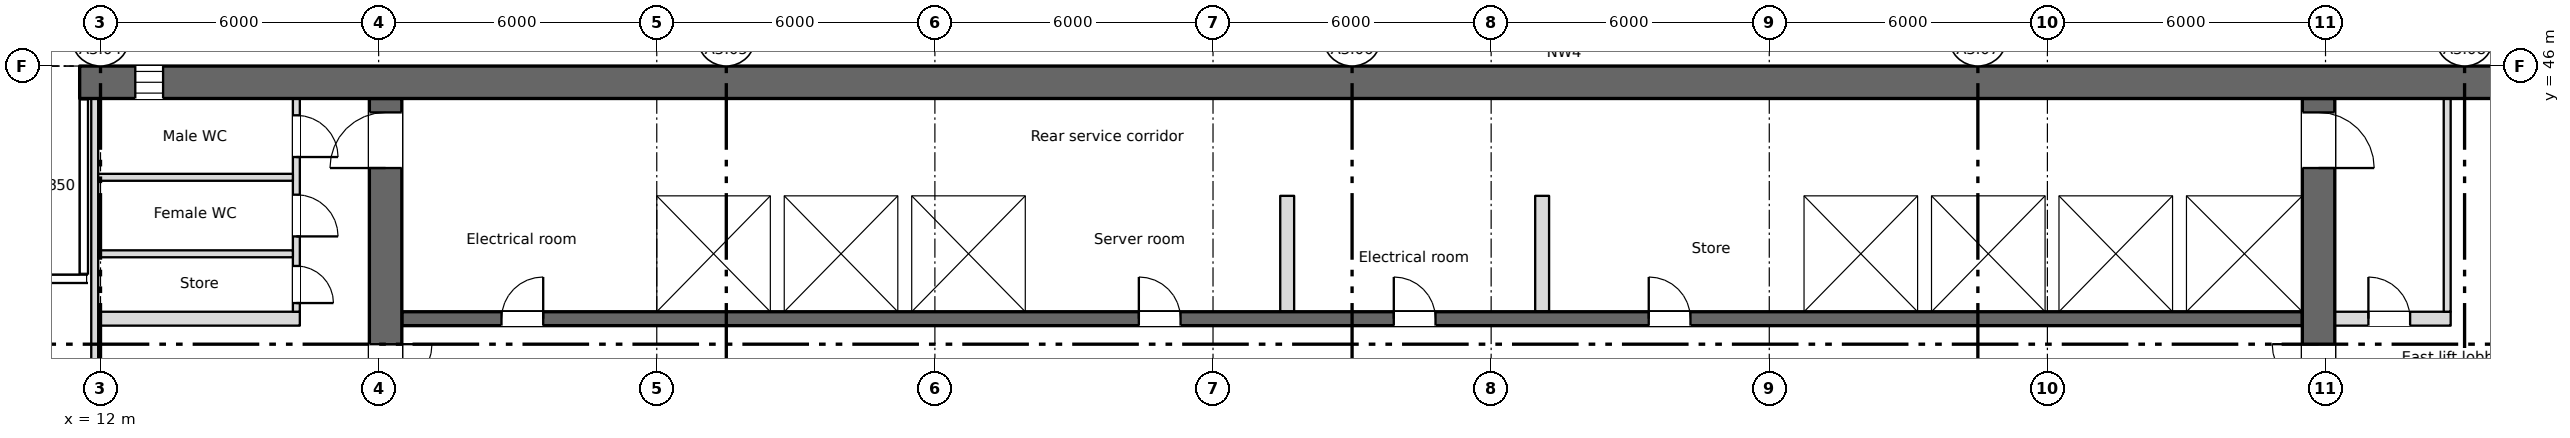
"""IFC4 building model, lengths in metres.
Left out: names, types, materials, properties, quantities, classifications, styles, units other than length and angle.
Written with IfcOpenShell. Run it as: python <this file> out.ifc"""

import sys

from ifc_helpers import new_model, si_unit, direction, frame, frame_2d, origin, place, context, subcontext, project, spatial, rectangle, extrude, element, fill, save


model = new_model("IFC4")
c1 = context("Model", 3, precision=1e-05, world=origin(), true_north=direction((0.0, 1.0)))
c2 = subcontext(c1, "Body", "Model", "MODEL_VIEW")
j1 = project(units=[si_unit("LENGTHUNIT", "METRE"), si_unit("PLANEANGLEUNIT", "RADIAN")], contexts=[c1])
p1 = place(None, origin())
s1 = spatial("IfcSite", under=j1, at=p1, CompositionType="ELEMENT")
p2 = place(p1, origin())
s2 = spatial("IfcBuilding", under=s1, at=p2, CompositionType="ELEMENT")
p3 = place(p2, frame((0.0, 0.0, 215.5)))
s3 = spatial("IfcBuildingStorey", under=s2, at=p3, CompositionType="ELEMENT", Elevation=215.5)
p4 = place(p3, frame((11.55, 45.65, 0.0), z_axis=(0.0, 0.0, 1.0), x_axis=(1.0, 0.0, 0.0)))
e1 = element("IfcWall", 1, at=p4, inside=s3, PredefinedType="SHEAR", context=c2, shape_type="SweptSolid", body=[
    extrude(rectangle(XDim=54.9, YDim=0.7, at=frame_2d((27.45, 0.0))), origin(), (0.0, 0.0, 1.0), 3.35),
])
p5 = place(p4, frame((1.2, 0.0, 0.6)))
e2 = element("IfcOpeningElement", 2, at=p5, cuts=e1, PredefinedType="OPENING", context=c2, shape_type="SweptSolid", body=[
    extrude(rectangle(XDim=0.6, YDim=2.4, at=frame_2d((0.3, 1.2))), frame((0.0, 0.36, 0.0), z_axis=(0.0, -1.0, 0.0), x_axis=(1.0, 0.0, 0.0)), (0.0, 0.0, 1.0), 0.72),
])
p6 = place(p3, frame((18.15, 28.4, 0.0), z_axis=(0.0, 0.0, 1.0), x_axis=(0.0, 1.0, 0.0)))
e3 = element("IfcWall", 3, at=p6, inside=s3, PredefinedType="SHEAR", context=c2, shape_type="SweptSolid", body=[
    extrude(rectangle(XDim=16.9, YDim=0.7, at=frame_2d((8.45, 0.0))), origin(), (0.0, 0.0, 1.0), 3.35),
])
p7 = place(p6, frame((9.6, 0.0, 0.0)))
e4 = element("IfcOpeningElement", 4, at=p7, cuts=e3, PredefinedType="OPENING", context=c2, shape_type="SweptSolid", body=[
    extrude(rectangle(XDim=2.0, YDim=2.1, at=frame_2d((1.0, 1.05))), frame((0.0, 0.36, 0.0), z_axis=(0.0, -1.0, 0.0), x_axis=(1.0, 0.0, 0.0)), (0.0, 0.0, 1.0), 0.72),
])
p8 = place(p6, frame((15.4, 0.0, 0.0)))
e5 = element("IfcOpeningElement", 5, at=p8, cuts=e3, PredefinedType="OPENING", context=c2, shape_type="SweptSolid", body=[
    extrude(rectangle(XDim=1.2, YDim=2.1, at=frame_2d((0.6, 1.05))), frame((0.0, 0.36, 0.0), z_axis=(0.0, -1.0, 0.0), x_axis=(1.0, 0.0, 0.0)), (0.0, 0.0, 1.0), 0.72),
])
p9 = place(p3, frame((59.85, 28.4, 0.0), z_axis=(0.0, 0.0, 1.0), x_axis=(0.0, 1.0, 0.0)))
e6 = element("IfcWall", 6, at=p9, inside=s3, PredefinedType="SHEAR", context=c2, shape_type="SweptSolid", body=[
    extrude(rectangle(XDim=16.9, YDim=0.7, at=frame_2d((8.45, 0.0))), origin(), (0.0, 0.0, 1.0), 3.35),
])
p10 = place(p9, frame((9.6, 0.0, 0.0)))
e7 = element("IfcOpeningElement", 7, at=p10, cuts=e6, PredefinedType="OPENING", context=c2, shape_type="SweptSolid", body=[
    extrude(rectangle(XDim=2.0, YDim=2.1, at=frame_2d((1.0, 1.05))), frame((0.0, 0.36, 0.0), z_axis=(0.0, -1.0, 0.0), x_axis=(1.0, 0.0, 0.0)), (0.0, 0.0, 1.0), 0.72),
])
p11 = place(p9, frame((15.4, 0.0, 0.0)))
e8 = element("IfcOpeningElement", 8, at=p11, cuts=e6, PredefinedType="OPENING", context=c2, shape_type="SweptSolid", body=[
    extrude(rectangle(XDim=1.2, YDim=2.1, at=frame_2d((0.6, 1.05))), frame((0.0, 0.36, 0.0), z_axis=(0.0, -1.0, 0.0), x_axis=(1.0, 0.0, 0.0)), (0.0, 0.0, 1.0), 0.72),
])
p12 = place(p3, frame((18.5, 40.55, 0.0), z_axis=(0.0, 0.0, 1.0), x_axis=(1.0, 0.0, 0.0)))
e9 = element("IfcWall", 9, at=p12, inside=s3, PredefinedType="SHEAR", context=c2, shape_type="SweptSolid", body=[
    extrude(rectangle(XDim=41.0, YDim=0.3, at=frame_2d((20.5, 0.0))), origin(), (0.0, 0.0, 1.0), 3.35),
])
p13 = place(p12, frame((2.15, 0.0, 0.0)))
e10 = element("IfcOpeningElement", 10, at=p13, cuts=e9, PredefinedType="OPENING", context=c2, shape_type="SweptSolid", body=[
    extrude(rectangle(XDim=0.9, YDim=2.1, at=frame_2d((0.45, 1.05))), frame((0.0, 0.16, 0.0), z_axis=(0.0, -1.0, 0.0), x_axis=(1.0, 0.0, 0.0)), (0.0, 0.0, 1.0), 0.32),
])
p14 = place(p12, frame((15.9, 0.0, 0.0)))
e11 = element("IfcOpeningElement", 11, at=p14, cuts=e9, PredefinedType="OPENING", context=c2, shape_type="SweptSolid", body=[
    extrude(rectangle(XDim=0.9, YDim=2.1, at=frame_2d((0.45, 1.05))), frame((0.0, 0.16, 0.0), z_axis=(0.0, -1.0, 0.0), x_axis=(1.0, 0.0, 0.0)), (0.0, 0.0, 1.0), 0.32),
])
p15 = place(p12, frame((21.4, 0.0, 0.0)))
e12 = element("IfcOpeningElement", 12, at=p15, cuts=e9, PredefinedType="OPENING", context=c2, shape_type="SweptSolid", body=[
    extrude(rectangle(XDim=0.9, YDim=2.1, at=frame_2d((0.45, 1.05))), frame((0.0, 0.16, 0.0), z_axis=(0.0, -1.0, 0.0), x_axis=(1.0, 0.0, 0.0)), (0.0, 0.0, 1.0), 0.32),
])
p16 = place(p12, frame((26.9, 0.0, 0.0)))
e13 = element("IfcOpeningElement", 13, at=p16, cuts=e9, PredefinedType="OPENING", context=c2, shape_type="SweptSolid", body=[
    extrude(rectangle(XDim=0.9, YDim=2.1, at=frame_2d((0.45, 1.05))), frame((0.0, 0.16, 0.0), z_axis=(0.0, -1.0, 0.0), x_axis=(1.0, 0.0, 0.0)), (0.0, 0.0, 1.0), 0.32),
])
p17 = place(p12, frame((6.175, 0.0, 0.0)))
e14 = element("IfcOpeningElement", 14, at=p17, cuts=e9, PredefinedType="OPENING", context=c2, shape_type="SweptSolid", body=[
    extrude(rectangle(XDim=1.1, YDim=2.1, at=frame_2d((0.55, 1.05))), frame((0.0, 0.16, 0.0), z_axis=(0.0, -1.0, 0.0), x_axis=(1.0, 0.0, 0.0)), (0.0, 0.0, 1.0), 0.32),
])
p18 = place(p12, frame((8.925, 0.0, 0.0)))
e15 = element("IfcOpeningElement", 15, at=p18, cuts=e9, PredefinedType="OPENING", context=c2, shape_type="SweptSolid", body=[
    extrude(rectangle(XDim=1.1, YDim=2.1, at=frame_2d((0.55, 1.05))), frame((0.0, 0.16, 0.0), z_axis=(0.0, -1.0, 0.0), x_axis=(1.0, 0.0, 0.0)), (0.0, 0.0, 1.0), 0.32),
])
p19 = place(p12, frame((11.675, 0.0, 0.0)))
e16 = element("IfcOpeningElement", 16, at=p19, cuts=e9, PredefinedType="OPENING", context=c2, shape_type="SweptSolid", body=[
    extrude(rectangle(XDim=1.1, YDim=2.1, at=frame_2d((0.55, 1.05))), frame((0.0, 0.16, 0.0), z_axis=(0.0, -1.0, 0.0), x_axis=(1.0, 0.0, 0.0)), (0.0, 0.0, 1.0), 0.32),
])
p20 = place(p12, frame((30.925, 0.0, 0.0)))
e17 = element("IfcOpeningElement", 17, at=p20, cuts=e9, PredefinedType="OPENING", context=c2, shape_type="SweptSolid", body=[
    extrude(rectangle(XDim=1.1, YDim=2.1, at=frame_2d((0.55, 1.05))), frame((0.0, 0.16, 0.0), z_axis=(0.0, -1.0, 0.0), x_axis=(1.0, 0.0, 0.0)), (0.0, 0.0, 1.0), 0.32),
])
p21 = place(p12, frame((33.675, 0.0, 0.0)))
e18 = element("IfcOpeningElement", 18, at=p21, cuts=e9, PredefinedType="OPENING", context=c2, shape_type="SweptSolid", body=[
    extrude(rectangle(XDim=1.1, YDim=2.1, at=frame_2d((0.55, 1.05))), frame((0.0, 0.16, 0.0), z_axis=(0.0, -1.0, 0.0), x_axis=(1.0, 0.0, 0.0)), (0.0, 0.0, 1.0), 0.32),
])
p22 = place(p12, frame((36.375, 0.0, 0.0)))
e19 = element("IfcOpeningElement", 19, at=p22, cuts=e9, PredefinedType="OPENING", context=c2, shape_type="SweptSolid", body=[
    extrude(rectangle(XDim=1.2, YDim=2.1, at=frame_2d((0.6, 1.05))), frame((0.0, 0.16, 0.0), z_axis=(0.0, -1.0, 0.0), x_axis=(1.0, 0.0, 0.0)), (0.0, 0.0, 1.0), 0.32),
])
p23 = place(p12, frame((39.15, 0.0, 0.0)))
e20 = element("IfcOpeningElement", 20, at=p23, cuts=e9, PredefinedType="OPENING", context=c2, shape_type="SweptSolid", body=[
    extrude(rectangle(XDim=1.2, YDim=2.1, at=frame_2d((0.6, 1.05))), frame((0.0, 0.16, 0.0), z_axis=(0.0, -1.0, 0.0), x_axis=(1.0, 0.0, 0.0)), (0.0, 0.0, 1.0), 0.32),
])
p24 = place(p3, frame((18.5, 43.35, 0.0), z_axis=(0.0, 0.0, 1.0), x_axis=(1.0, 0.0, 0.0)))
e21 = element("IfcWall", 21, at=p24, inside=s3, PredefinedType="SHEAR", context=c2, shape_type="SweptSolid", body=[
    extrude(rectangle(XDim=41.0, YDim=0.3, at=frame_2d((20.5, 0.0))), origin(), (0.0, 0.0, 1.0), 3.35),
])
p25 = place(p3, frame((11.95, 40.55, 0.0), z_axis=(0.0, 0.0, 1.0), x_axis=(1.0, 0.0, 0.0)))
e22 = element("IfcWall", 22, at=p25, inside=s3, PredefinedType="PARTITIONING", context=c2, shape_type="SweptSolid", body=[
    extrude(rectangle(XDim=4.35, YDim=0.3, at=frame_2d((2.175, 0.0))), origin(), (0.0, 0.0, 1.0), 3.35),
])
p26 = place(p3, frame((60.2, 40.55, 0.0), z_axis=(0.0, 0.0, 1.0), x_axis=(1.0, 0.0, 0.0)))
e23 = element("IfcWall", 23, at=p26, inside=s3, PredefinedType="PARTITIONING", context=c2, shape_type="SweptSolid", body=[
    extrude(rectangle(XDim=2.5, YDim=0.3, at=frame_2d((1.25, 0.0))), origin(), (0.0, 0.0, 1.0), 3.35),
])
p27 = place(p26, frame((0.725, 0.0, 0.0)))
e24 = element("IfcOpeningElement", 24, at=p27, cuts=e23, PredefinedType="OPENING", context=c2, shape_type="SweptSolid", body=[
    extrude(rectangle(XDim=0.9, YDim=2.1, at=frame_2d((0.45, 1.05))), frame((0.0, 0.16, 0.0), z_axis=(0.0, -1.0, 0.0), x_axis=(1.0, 0.0, 0.0)), (0.0, 0.0, 1.0), 0.32),
])
for number, where, z_axis, x_axis in (
    (25, (23.85, 40.7, 0.0), (0.0, 0.0, 1.0), (0.0, 1.0, 0.0)),
    (26, (26.6, 40.7, 0.0), (0.0, 0.0, 1.0), (0.0, 1.0, 0.0)),
    (27, (29.35, 40.7, 0.0), (0.0, 0.0, 1.0), (0.0, 1.0, 0.0)),
    (28, (32.1, 40.7, 0.0), (0.0, 0.0, 1.0), (0.0, 1.0, 0.0)),
    (29, (48.6, 40.7, 0.0), (0.0, 0.0, 1.0), (0.0, 1.0, 0.0)),
    (30, (51.35, 40.7, 0.0), (0.0, 0.0, 1.0), (0.0, 1.0, 0.0)),
    (31, (54.1, 40.7, 0.0), (0.0, 0.0, 1.0), (0.0, 1.0, 0.0)),
    (32, (56.85, 40.7, 0.0), (0.0, 0.0, 1.0), (0.0, 1.0, 0.0)),
):
    element("IfcWall", number, at=place(p3, frame(where, z_axis=z_axis, x_axis=x_axis)), inside=s3, PredefinedType="SHEAR", context=c2, shape_type="SweptSolid", body=[
        extrude(rectangle(XDim=2.5, YDim=0.3, at=frame_2d((1.25, 0.0))), origin(), (0.0, 0.0, 1.0), 3.35),
    ])
p28 = place(p3, frame((16.225, 45.3, 0.0), z_axis=(0.0, 0.0, 1.0), x_axis=(0.0, -1.0, 0.0)))
e33 = element("IfcWall", 33, at=p28, inside=s3, PredefinedType="PARTITIONING", context=c2, shape_type="SweptSolid", body=[
    extrude(rectangle(XDim=4.6, YDim=0.15, at=frame_2d((2.3, 0.0))), origin(), (0.0, 0.0, 1.0), 3.35),
])
p29 = place(p28, frame((3.613, 0.0, 0.0)))
e34 = element("IfcOpeningElement", 34, at=p29, cuts=e33, PredefinedType="OPENING", context=c2, shape_type="SweptSolid", body=[
    extrude(rectangle(XDim=0.8, YDim=2.1, at=frame_2d((0.4, 1.05))), frame((0.0, 0.085, 0.0), z_axis=(0.0, -1.0, 0.0), x_axis=(1.0, 0.0, 0.0)), (0.0, 0.0, 1.0), 0.17),
])
p30 = place(p28, frame((2.075, 0.0, 0.0)))
e35 = element("IfcOpeningElement", 35, at=p30, cuts=e33, PredefinedType="OPENING", context=c2, shape_type="SweptSolid", body=[
    extrude(rectangle(XDim=0.9, YDim=2.1, at=frame_2d((0.45, 1.05))), frame((0.0, 0.085, 0.0), z_axis=(0.0, -1.0, 0.0), x_axis=(1.0, 0.0, 0.0)), (0.0, 0.0, 1.0), 0.17),
])
p31 = place(p28, frame((0.363, 0.0, 0.0)))
e36 = element("IfcOpeningElement", 36, at=p31, cuts=e33, PredefinedType="OPENING", context=c2, shape_type="SweptSolid", body=[
    extrude(rectangle(XDim=0.9, YDim=2.1, at=frame_2d((0.45, 1.05))), frame((0.0, 0.085, 0.0), z_axis=(0.0, -1.0, 0.0), x_axis=(1.0, 0.0, 0.0)), (0.0, 0.0, 1.0), 0.17),
])
p32 = place(p3, frame((62.625, 40.7, 0.0), z_axis=(0.0, 0.0, 1.0), x_axis=(0.0, 1.0, 0.0)))
e37 = element("IfcWall", 37, at=p32, inside=s3, PredefinedType="PARTITIONING", context=c2, shape_type="SweptSolid", body=[
    extrude(rectangle(XDim=4.6, YDim=0.15, at=frame_2d((2.3, 0.0))), origin(), (0.0, 0.0, 1.0), 3.35),
])
p33 = place(p3, frame((11.875, 39.45, 0.0), z_axis=(0.0, 0.0, 1.0), x_axis=(0.0, 1.0, 0.0)))
e38 = element("IfcWall", 38, at=p33, inside=s3, PredefinedType="PARTITIONING", context=c2, shape_type="SweptSolid", body=[
    extrude(rectangle(XDim=5.85, YDim=0.15, at=frame_2d((2.925, 0.0))), origin(), (0.0, 0.0, 1.0), 3.35),
])
for number, where, z_axis, x_axis in (
    (39, (11.95, 41.95, 0.0), (0.0, 0.0, 1.0), (1.0, 0.0, 0.0)),
    (40, (11.95, 43.6, 0.0), (0.0, 0.0, 1.0), (1.0, 0.0, 0.0)),
):
    element("IfcWall", number, at=place(p3, frame(where, z_axis=z_axis, x_axis=x_axis)), inside=s3, PredefinedType="PARTITIONING", context=c2, shape_type="SweptSolid", body=[
        extrude(rectangle(XDim=4.2, YDim=0.15, at=frame_2d((2.1, 0.0))), origin(), (0.0, 0.0, 1.0), 3.35),
    ])
for number, where, z_axis, x_axis in (
    (41, (37.6, 40.7, 0.0), (0.0, 0.0, 1.0), (0.0, 1.0, 0.0)),
    (42, (43.1, 40.7, 0.0), (0.0, 0.0, 1.0), (0.0, 1.0, 0.0)),
):
    element("IfcWall", number, at=place(p3, frame(where, z_axis=z_axis, x_axis=x_axis)), inside=s3, PredefinedType="PARTITIONING", context=c2, shape_type="SweptSolid", body=[
        extrude(rectangle(XDim=2.5, YDim=0.3, at=frame_2d((1.25, 0.0))), origin(), (0.0, 0.0, 1.0), 3.35),
    ])
p34 = place(p5, origin())
e43 = element("IfcWindow", 43, at=p34, inside=s3, PartitioningType="SINGLE_PANEL", PredefinedType="WINDOW", context=c2, shape_type="SweptSolid", body=[
    extrude(rectangle(XDim=0.6, YDim=2.4, at=frame_2d((0.3, 1.2))), frame((0.0, 0.03, 0.0), z_axis=(0.0, -1.0, 0.0), x_axis=(1.0, 0.0, 0.0)), (0.0, 0.0, 1.0), 0.06),
])
fill(e2, e43)
p35 = place(p27, origin())
e44 = element("IfcDoor", 44, at=p35, inside=s3, OperationType="SINGLE_SWING_LEFT", PredefinedType="DOOR", context=c2, shape_type="SweptSolid", body=[
    extrude(rectangle(XDim=0.9, YDim=2.1, at=frame_2d((0.45, 1.05))), frame((0.0, 0.025, 0.0), z_axis=(0.0, -1.0, 0.0), x_axis=(1.0, 0.0, 0.0)), (0.0, 0.0, 1.0), 0.05),
])
fill(e24, e44)
p36 = place(p29, origin())
e45 = element("IfcDoor", 45, at=p36, inside=s3, OperationType="SINGLE_SWING_RIGHT", PredefinedType="DOOR", context=c2, shape_type="SweptSolid", body=[
    extrude(rectangle(XDim=0.8, YDim=2.1, at=frame_2d((0.4, 1.05))), frame((0.0, 0.025, 0.0), z_axis=(0.0, -1.0, 0.0), x_axis=(1.0, 0.0, 0.0)), (0.0, 0.0, 1.0), 0.05),
])
fill(e34, e45)
p37 = place(p30, origin())
e46 = element("IfcDoor", 46, at=p37, inside=s3, OperationType="SINGLE_SWING_RIGHT", PredefinedType="DOOR", context=c2, shape_type="SweptSolid", body=[
    extrude(rectangle(XDim=0.9, YDim=2.1, at=frame_2d((0.45, 1.05))), frame((0.0, 0.025, 0.0), z_axis=(0.0, -1.0, 0.0), x_axis=(1.0, 0.0, 0.0)), (0.0, 0.0, 1.0), 0.05),
])
fill(e35, e46)
p38 = place(p31, origin())
e47 = element("IfcDoor", 47, at=p38, inside=s3, OperationType="SINGLE_SWING_RIGHT", PredefinedType="DOOR", context=c2, shape_type="SweptSolid", body=[
    extrude(rectangle(XDim=0.9, YDim=2.1, at=frame_2d((0.45, 1.05))), frame((0.0, 0.025, 0.0), z_axis=(0.0, -1.0, 0.0), x_axis=(1.0, 0.0, 0.0)), (0.0, 0.0, 1.0), 0.05),
])
fill(e36, e47)
p39 = place(p13, origin())
e48 = element("IfcDoor", 48, at=p39, inside=s3, OperationType="SINGLE_SWING_RIGHT", PredefinedType="DOOR", context=c2, shape_type="SweptSolid", body=[
    extrude(rectangle(XDim=0.9, YDim=2.1, at=frame_2d((0.45, 1.05))), frame((0.0, 0.025, 0.0), z_axis=(0.0, -1.0, 0.0), x_axis=(1.0, 0.0, 0.0)), (0.0, 0.0, 1.0), 0.05),
])
fill(e10, e48)
p40 = place(p14, origin())
e49 = element("IfcDoor", 49, at=p40, inside=s3, OperationType="SINGLE_SWING_LEFT", PredefinedType="DOOR", context=c2, shape_type="SweptSolid", body=[
    extrude(rectangle(XDim=0.9, YDim=2.1, at=frame_2d((0.45, 1.05))), frame((0.0, 0.025, 0.0), z_axis=(0.0, -1.0, 0.0), x_axis=(1.0, 0.0, 0.0)), (0.0, 0.0, 1.0), 0.05),
])
fill(e11, e49)
p41 = place(p15, origin())
e50 = element("IfcDoor", 50, at=p41, inside=s3, OperationType="SINGLE_SWING_LEFT", PredefinedType="DOOR", context=c2, shape_type="SweptSolid", body=[
    extrude(rectangle(XDim=0.9, YDim=2.1, at=frame_2d((0.45, 1.05))), frame((0.0, 0.025, 0.0), z_axis=(0.0, -1.0, 0.0), x_axis=(1.0, 0.0, 0.0)), (0.0, 0.0, 1.0), 0.05),
])
fill(e12, e50)
p42 = place(p16, origin())
e51 = element("IfcDoor", 51, at=p42, inside=s3, OperationType="SINGLE_SWING_LEFT", PredefinedType="DOOR", context=c2, shape_type="SweptSolid", body=[
    extrude(rectangle(XDim=0.9, YDim=2.1, at=frame_2d((0.45, 1.05))), frame((0.0, 0.025, 0.0), z_axis=(0.0, -1.0, 0.0), x_axis=(1.0, 0.0, 0.0)), (0.0, 0.0, 1.0), 0.05),
])
fill(e13, e51)
p43 = place(p17, origin())
e52 = element("IfcDoor", 52, at=p43, inside=s3, OperationType="SLIDING_TO_LEFT", PredefinedType="DOOR", context=c2, shape_type="SweptSolid", body=[
    extrude(rectangle(XDim=1.1, YDim=2.1, at=frame_2d((0.55, 1.05))), frame((0.0, 0.025, 0.0), z_axis=(0.0, -1.0, 0.0), x_axis=(1.0, 0.0, 0.0)), (0.0, 0.0, 1.0), 0.05),
])
fill(e14, e52)
p44 = place(p18, origin())
e53 = element("IfcDoor", 53, at=p44, inside=s3, OperationType="SLIDING_TO_LEFT", PredefinedType="DOOR", context=c2, shape_type="SweptSolid", body=[
    extrude(rectangle(XDim=1.1, YDim=2.1, at=frame_2d((0.55, 1.05))), frame((0.0, 0.025, 0.0), z_axis=(0.0, -1.0, 0.0), x_axis=(1.0, 0.0, 0.0)), (0.0, 0.0, 1.0), 0.05),
])
fill(e15, e53)
p45 = place(p19, origin())
e54 = element("IfcDoor", 54, at=p45, inside=s3, OperationType="SLIDING_TO_LEFT", PredefinedType="DOOR", context=c2, shape_type="SweptSolid", body=[
    extrude(rectangle(XDim=1.1, YDim=2.1, at=frame_2d((0.55, 1.05))), frame((0.0, 0.025, 0.0), z_axis=(0.0, -1.0, 0.0), x_axis=(1.0, 0.0, 0.0)), (0.0, 0.0, 1.0), 0.05),
])
fill(e16, e54)
p46 = place(p20, origin())
e55 = element("IfcDoor", 55, at=p46, inside=s3, OperationType="SLIDING_TO_LEFT", PredefinedType="DOOR", context=c2, shape_type="SweptSolid", body=[
    extrude(rectangle(XDim=1.1, YDim=2.1, at=frame_2d((0.55, 1.05))), frame((0.0, 0.025, 0.0), z_axis=(0.0, -1.0, 0.0), x_axis=(1.0, 0.0, 0.0)), (0.0, 0.0, 1.0), 0.05),
])
fill(e17, e55)
p47 = place(p21, origin())
e56 = element("IfcDoor", 56, at=p47, inside=s3, OperationType="SLIDING_TO_LEFT", PredefinedType="DOOR", context=c2, shape_type="SweptSolid", body=[
    extrude(rectangle(XDim=1.1, YDim=2.1, at=frame_2d((0.55, 1.05))), frame((0.0, 0.025, 0.0), z_axis=(0.0, -1.0, 0.0), x_axis=(1.0, 0.0, 0.0)), (0.0, 0.0, 1.0), 0.05),
])
fill(e18, e56)
p48 = place(p22, origin())
e57 = element("IfcDoor", 57, at=p48, inside=s3, OperationType="SLIDING_TO_LEFT", PredefinedType="DOOR", context=c2, shape_type="SweptSolid", body=[
    extrude(rectangle(XDim=1.2, YDim=2.1, at=frame_2d((0.6, 1.05))), frame((0.0, 0.025, 0.0), z_axis=(0.0, -1.0, 0.0), x_axis=(1.0, 0.0, 0.0)), (0.0, 0.0, 1.0), 0.05),
])
fill(e19, e57)
p49 = place(p23, origin())
e58 = element("IfcDoor", 58, at=p49, inside=s3, OperationType="SLIDING_TO_LEFT", PredefinedType="DOOR", context=c2, shape_type="SweptSolid", body=[
    extrude(rectangle(XDim=1.2, YDim=2.1, at=frame_2d((0.6, 1.05))), frame((0.0, 0.025, 0.0), z_axis=(0.0, -1.0, 0.0), x_axis=(1.0, 0.0, 0.0)), (0.0, 0.0, 1.0), 0.05),
])
fill(e20, e58)
p50 = place(p7, origin())
e59 = element("IfcDoor", 59, at=p50, inside=s3, OperationType="DOUBLE_DOOR_SINGLE_SWING", PredefinedType="DOOR", context=c2, shape_type="SweptSolid", body=[
    extrude(rectangle(XDim=2.0, YDim=2.1, at=frame_2d((1.0, 1.05))), frame((0.0, 0.025, 0.0), z_axis=(0.0, -1.0, 0.0), x_axis=(1.0, 0.0, 0.0)), (0.0, 0.0, 1.0), 0.05),
])
fill(e4, e59)
p51 = place(p10, origin())
e60 = element("IfcDoor", 60, at=p51, inside=s3, OperationType="DOUBLE_DOOR_SINGLE_SWING", PredefinedType="DOOR", context=c2, shape_type="SweptSolid", body=[
    extrude(rectangle(XDim=2.0, YDim=2.1, at=frame_2d((1.0, 1.05))), frame((0.0, 0.025, 0.0), z_axis=(0.0, -1.0, 0.0), x_axis=(1.0, 0.0, 0.0)), (0.0, 0.0, 1.0), 0.05),
])
fill(e7, e60)
p52 = place(p8, origin())
e61 = element("IfcDoor", 61, at=p52, inside=s3, OperationType="SINGLE_SWING_LEFT", PredefinedType="DOOR", context=c2, shape_type="SweptSolid", body=[
    extrude(rectangle(XDim=1.2, YDim=2.1, at=frame_2d((0.6, 1.05))), frame((0.0, 0.025, 0.0), z_axis=(0.0, -1.0, 0.0), x_axis=(1.0, 0.0, 0.0)), (0.0, 0.0, 1.0), 0.05),
])
fill(e5, e61)
p53 = place(p11, origin())
e62 = element("IfcDoor", 62, at=p53, inside=s3, OperationType="SINGLE_SWING_LEFT", PredefinedType="DOOR", context=c2, shape_type="SweptSolid", body=[
    extrude(rectangle(XDim=1.2, YDim=2.1, at=frame_2d((0.6, 1.05))), frame((0.0, 0.025, 0.0), z_axis=(0.0, -1.0, 0.0), x_axis=(1.0, 0.0, 0.0)), (0.0, 0.0, 1.0), 0.05),
])
fill(e8, e62)
save(model, sys.argv[1])
